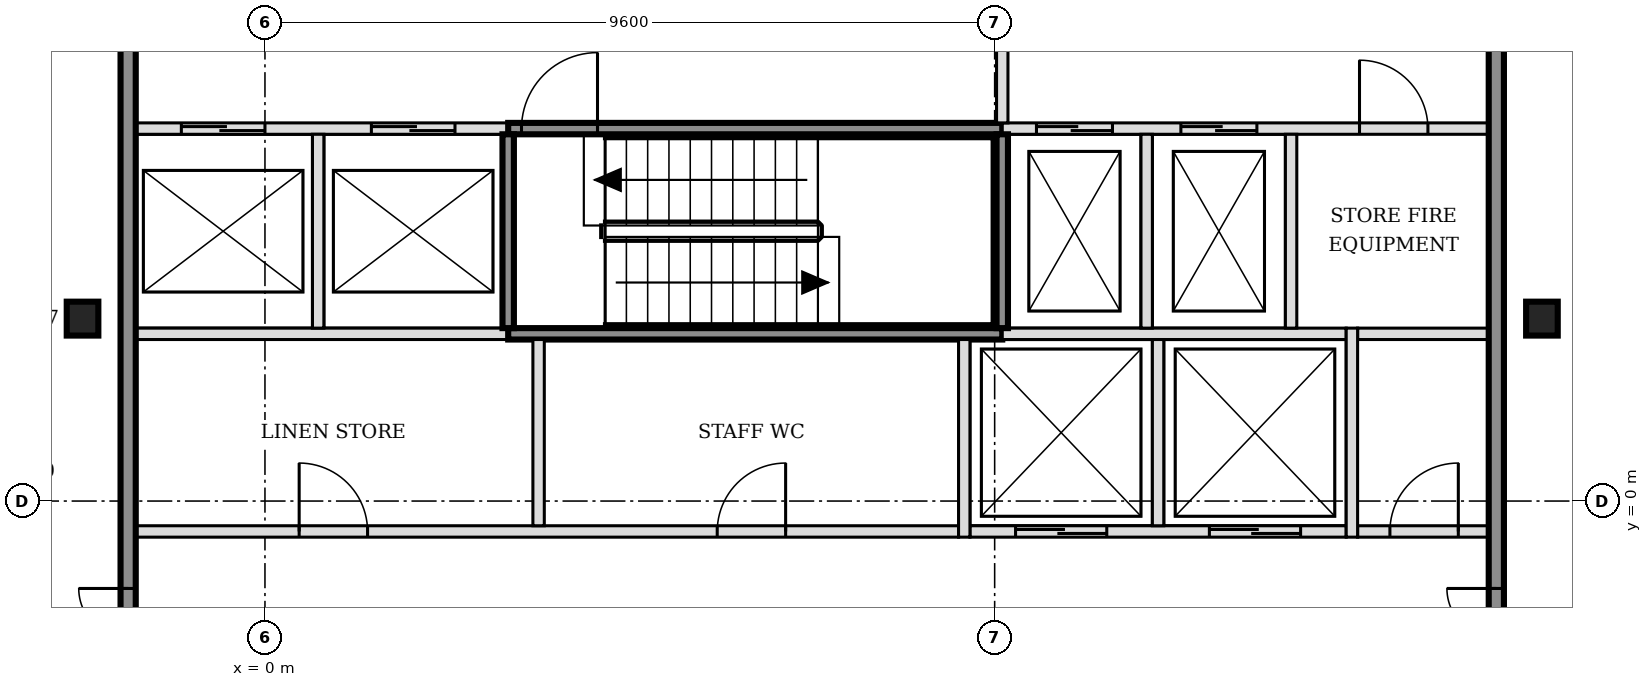
"""IFC4 building model, lengths in metres.
Left out: names, types, materials, properties, quantities, classifications, styles, units other than length and angle.
Written with IfcOpenShell. Run it as: python <this file> out.ifc"""

import sys

from ifc_helpers import new_model, si_unit, direction, frame, frame_2d, origin, origin_2d, place, context, subcontext, project, spatial, rectangle, i_section, extrude, element, fill, save


model = new_model("IFC4")
c1 = context("Model", 3, precision=1e-05, world=origin(), true_north=direction((0.0, 1.0)))
c2 = subcontext(c1, "Body", "Model", "MODEL_VIEW")
j1 = project(units=[si_unit("LENGTHUNIT", "METRE"), si_unit("PLANEANGLEUNIT", "RADIAN")], contexts=[c1])
p1 = place(None, origin())
s1 = spatial("IfcSite", under=j1, at=p1, CompositionType="ELEMENT")
p2 = place(p1, origin())
s2 = spatial("IfcBuilding", under=s1, at=p2, CompositionType="ELEMENT")
p3 = place(p2, frame((0.0, 0.0, 179.4)))
s3 = spatial("IfcBuildingStorey", under=s2, at=p3, CompositionType="ELEMENT", Elevation=179.4)
for number, where, z_axis, x_axis in (
    (1, (-2.4, 2.4, -0.15), (0.0, 0.0, 1.0), (1.0, 0.0, 0.0)),
    (2, (16.8, 2.4, -0.15), (0.0, 0.0, 1.0), (1.0, 0.0, 0.0)),
):
    element("IfcColumn", number, at=place(p3, frame(where, z_axis=z_axis, x_axis=x_axis)), inside=s3, PredefinedType="COLUMN", context=c2, shape_type="SweptSolid", body=[
        extrude(i_section(OverallWidth=0.416, OverallDepth=0.446, WebThickness=0.039, FlangeThickness=0.063, FilletRadius=0.015, at=origin_2d()), origin(), (0.0, 0.0, 1.0), 3.6),
    ])
p4 = place(p3, frame((-1.7, -0.4, 0.0), z_axis=(0.0, 0.0, 1.0), x_axis=(1.0, 0.0, 0.0)))
e3 = element("IfcWall", 3, at=p4, inside=s3, PredefinedType="PARTITIONING", context=c2, shape_type="SweptSolid", body=[
    extrude(rectangle(XDim=10.825, YDim=0.15, at=frame_2d((5.413, 0.0))), origin(), (0.0, 0.0, 1.0), 3.45),
])
p5 = place(p4, frame((2.15, 0.0, 0.0)))
e4 = element("IfcOpeningElement", 4, at=p5, cuts=e3, PredefinedType="OPENING", context=c2, shape_type="SweptSolid", body=[
    extrude(rectangle(XDim=0.9, YDim=2.1, at=frame_2d((0.45, 1.05))), frame((0.0, 0.085, 0.0), z_axis=(0.0, -1.0, 0.0), x_axis=(1.0, 0.0, 0.0)), (0.0, 0.0, 1.0), 0.17),
])
p6 = place(p4, frame((7.65, 0.0, 0.0)))
e5 = element("IfcOpeningElement", 5, at=p6, cuts=e3, PredefinedType="OPENING", context=c2, shape_type="SweptSolid", body=[
    extrude(rectangle(XDim=0.9, YDim=2.1, at=frame_2d((0.45, 1.05))), frame((0.0, 0.085, 0.0), z_axis=(0.0, -1.0, 0.0), x_axis=(1.0, 0.0, 0.0)), (0.0, 0.0, 1.0), 0.17),
])
p7 = place(p3, frame((9.275, -0.4, 0.0), z_axis=(0.0, 0.0, 1.0), x_axis=(1.0, 0.0, 0.0)))
e6 = element("IfcWall", 6, at=p7, inside=s3, PredefinedType="SOLIDWALL", context=c2, shape_type="SweptSolid", body=[
    extrude(rectangle(XDim=4.95, YDim=0.15, at=frame_2d((2.475, 0.0))), origin(), (0.0, 0.0, 1.0), 3.45),
])
p8 = place(p7, frame((0.6, 0.0, 0.0)))
e7 = element("IfcOpeningElement", 7, at=p8, cuts=e6, PredefinedType="OPENING", context=c2, shape_type="SweptSolid", body=[
    extrude(rectangle(XDim=1.2, YDim=2.1, at=frame_2d((0.6, 1.05))), frame((0.0, 0.085, 0.0), z_axis=(0.0, -1.0, 0.0), x_axis=(1.0, 0.0, 0.0)), (0.0, 0.0, 1.0), 0.17),
])
p9 = place(p7, frame((3.15, 0.0, 0.0)))
e8 = element("IfcOpeningElement", 8, at=p9, cuts=e6, PredefinedType="OPENING", context=c2, shape_type="SweptSolid", body=[
    extrude(rectangle(XDim=1.2, YDim=2.1, at=frame_2d((0.6, 1.05))), frame((0.0, 0.085, 0.0), z_axis=(0.0, -1.0, 0.0), x_axis=(1.0, 0.0, 0.0)), (0.0, 0.0, 1.0), 0.17),
])
p10 = place(p3, frame((14.375, -0.4, 0.0), z_axis=(0.0, 0.0, 1.0), x_axis=(1.0, 0.0, 0.0)))
e9 = element("IfcWall", 9, at=p10, inside=s3, PredefinedType="PARTITIONING", context=c2, shape_type="SweptSolid", body=[
    extrude(rectangle(XDim=1.725, YDim=0.15, at=frame_2d((0.863, 0.0))), origin(), (0.0, 0.0, 1.0), 3.45),
])
p11 = place(p10, frame((0.425, 0.0, 0.0)))
e10 = element("IfcOpeningElement", 10, at=p11, cuts=e9, PredefinedType="OPENING", context=c2, shape_type="SweptSolid", body=[
    extrude(rectangle(XDim=0.9, YDim=2.1, at=frame_2d((0.45, 1.05))), frame((0.0, 0.085, 0.0), z_axis=(0.0, -1.0, 0.0), x_axis=(1.0, 0.0, 0.0)), (0.0, 0.0, 1.0), 0.17),
])
p12 = place(p3, frame((-1.7, 2.2, 0.0), z_axis=(0.0, 0.0, 1.0), x_axis=(1.0, 0.0, 0.0)))
e11 = element("IfcWall", 11, at=p12, inside=s3, PredefinedType="SOLIDWALL", context=c2, shape_type="SweptSolid", body=[
    extrude(rectangle(XDim=4.9, YDim=0.15, at=frame_2d((2.45, 0.0))), origin(), (0.0, 0.0, 1.0), 3.45),
])
p13 = place(p3, frame((3.2, 2.2, 0.0), z_axis=(0.0, 0.0, 1.0), x_axis=(1.0, 0.0, 0.0)))
e12 = element("IfcWall", 12, at=p13, inside=s3, PredefinedType="SOLIDWALL", context=c2, shape_type="SweptSolid", body=[
    extrude(rectangle(XDim=6.5, YDim=0.15, at=frame_2d((3.25, 0.0))), origin(), (0.0, 0.0, 1.0), 3.45),
])
p14 = place(p3, frame((9.7, 2.2, 0.0), z_axis=(0.0, 0.0, 1.0), x_axis=(1.0, 0.0, 0.0)))
e13 = element("IfcWall", 13, at=p14, inside=s3, PredefinedType="SOLIDWALL", context=c2, shape_type="SweptSolid", body=[
    extrude(rectangle(XDim=4.525, YDim=0.15, at=frame_2d((2.263, 0.0))), origin(), (0.0, 0.0, 1.0), 3.45),
])
p15 = place(p3, frame((14.375, 2.2, 0.0), z_axis=(0.0, 0.0, 1.0), x_axis=(1.0, 0.0, 0.0)))
e14 = element("IfcWall", 14, at=p15, inside=s3, PredefinedType="PARTITIONING", context=c2, shape_type="SweptSolid", body=[
    extrude(rectangle(XDim=1.725, YDim=0.15, at=frame_2d((0.863, 0.0))), origin(), (0.0, 0.0, 1.0), 3.45),
])
p16 = place(p3, frame((-1.7, 4.9, 0.0), z_axis=(0.0, 0.0, 1.0), x_axis=(1.0, 0.0, 0.0)))
e15 = element("IfcWall", 15, at=p16, inside=s3, PredefinedType="SOLIDWALL", context=c2, shape_type="SweptSolid", body=[
    extrude(rectangle(XDim=4.9, YDim=0.15, at=frame_2d((2.45, 0.0))), origin(), (0.0, 0.0, 1.0), 3.45),
])
p17 = place(p16, frame((0.6, 0.0, 0.0)))
e16 = element("IfcOpeningElement", 16, at=p17, cuts=e15, PredefinedType="OPENING", context=c2, shape_type="SweptSolid", body=[
    extrude(rectangle(XDim=1.1, YDim=2.1, at=frame_2d((0.55, 1.05))), frame((0.0, 0.085, 0.0), z_axis=(0.0, -1.0, 0.0), x_axis=(1.0, 0.0, 0.0)), (0.0, 0.0, 1.0), 0.17),
])
p18 = place(p16, frame((3.1, 0.0, 0.0)))
e17 = element("IfcOpeningElement", 17, at=p18, cuts=e15, PredefinedType="OPENING", context=c2, shape_type="SweptSolid", body=[
    extrude(rectangle(XDim=1.1, YDim=2.1, at=frame_2d((0.55, 1.05))), frame((0.0, 0.085, 0.0), z_axis=(0.0, -1.0, 0.0), x_axis=(1.0, 0.0, 0.0)), (0.0, 0.0, 1.0), 0.17),
])
p19 = place(p3, frame((3.2, 4.9, 0.0), z_axis=(0.0, 0.0, 1.0), x_axis=(1.0, 0.0, 0.0)))
e18 = element("IfcWall", 18, at=p19, inside=s3, PredefinedType="SOLIDWALL", context=c2, shape_type="SweptSolid", body=[
    extrude(rectangle(XDim=6.5, YDim=0.15, at=frame_2d((3.25, 0.0))), origin(), (0.0, 0.0, 1.0), 3.45),
])
p20 = place(p19, frame((0.175, 0.0, 0.0)))
e19 = element("IfcOpeningElement", 19, at=p20, cuts=e18, PredefinedType="OPENING", context=c2, shape_type="SweptSolid", body=[
    extrude(rectangle(XDim=1.0, YDim=2.1, at=frame_2d((0.5, 1.05))), frame((0.0, 0.085, 0.0), z_axis=(0.0, -1.0, 0.0), x_axis=(1.0, 0.0, 0.0)), (0.0, 0.0, 1.0), 0.17),
])
p21 = place(p3, frame((9.7, 4.9, 0.0), z_axis=(0.0, 0.0, 1.0), x_axis=(1.0, 0.0, 0.0)))
e20 = element("IfcWall", 20, at=p21, inside=s3, PredefinedType="SOLIDWALL", context=c2, shape_type="SweptSolid", body=[
    extrude(rectangle(XDim=6.4, YDim=0.15, at=frame_2d((3.2, 0.0))), origin(), (0.0, 0.0, 1.0), 3.45),
])
p22 = place(p21, frame((0.45, 0.0, 0.0)))
e21 = element("IfcOpeningElement", 21, at=p22, cuts=e20, PredefinedType="OPENING", context=c2, shape_type="SweptSolid", body=[
    extrude(rectangle(XDim=1.0, YDim=2.1, at=frame_2d((0.5, 1.05))), frame((0.0, 0.085, 0.0), z_axis=(0.0, -1.0, 0.0), x_axis=(1.0, 0.0, 0.0)), (0.0, 0.0, 1.0), 0.17),
])
p23 = place(p21, frame((2.35, 0.0, 0.0)))
e22 = element("IfcOpeningElement", 22, at=p23, cuts=e20, PredefinedType="OPENING", context=c2, shape_type="SweptSolid", body=[
    extrude(rectangle(XDim=1.0, YDim=2.1, at=frame_2d((0.5, 1.05))), frame((0.0, 0.085, 0.0), z_axis=(0.0, -1.0, 0.0), x_axis=(1.0, 0.0, 0.0)), (0.0, 0.0, 1.0), 0.17),
])
p24 = place(p21, frame((4.7, 0.0, 0.0)))
e23 = element("IfcOpeningElement", 23, at=p24, cuts=e20, PredefinedType="OPENING", context=c2, shape_type="SweptSolid", body=[
    extrude(rectangle(XDim=0.9, YDim=2.1, at=frame_2d((0.45, 1.05))), frame((0.0, 0.085, 0.0), z_axis=(0.0, -1.0, 0.0), x_axis=(1.0, 0.0, 0.0)), (0.0, 0.0, 1.0), 0.17),
])
p25 = place(p3, frame((-1.8, -5.5, 0.0), z_axis=(0.0, 0.0, 1.0), x_axis=(0.0, 1.0, 0.0)))
e24 = element("IfcWall", 24, at=p25, inside=s3, PredefinedType="SOLIDWALL", context=c2, shape_type="SweptSolid", body=[
    extrude(rectangle(XDim=15.8, YDim=0.2, at=frame_2d((7.9, 0.0))), origin(), (0.0, 0.0, 1.0), 3.45),
])
p26 = place(p25, frame((3.05, 0.0, 0.0)))
e25 = element("IfcOpeningElement", 25, at=p26, cuts=e24, PredefinedType="OPENING", context=c2, shape_type="SweptSolid", body=[
    extrude(rectangle(XDim=1.3, YDim=2.1, at=frame_2d((0.65, 1.05))), frame((0.0, 0.11, 0.0), z_axis=(0.0, -1.0, 0.0), x_axis=(1.0, 0.0, 0.0)), (0.0, 0.0, 1.0), 0.22),
])
p27 = place(p25, frame((11.45, 0.0, 0.0)))
e26 = element("IfcOpeningElement", 26, at=p27, cuts=e24, PredefinedType="OPENING", context=c2, shape_type="SweptSolid", body=[
    extrude(rectangle(XDim=1.3, YDim=2.1, at=frame_2d((0.65, 1.05))), frame((0.0, 0.11, 0.0), z_axis=(0.0, -1.0, 0.0), x_axis=(1.0, 0.0, 0.0)), (0.0, 0.0, 1.0), 0.22),
])
for number, where, z_axis, x_axis in (
    (27, (0.7, 2.275, 0.0), (0.0, 0.0, 1.0), (0.0, 1.0, 0.0)),
    (28, (3.2, 2.275, 0.0), (0.0, 0.0, 1.0), (0.0, 1.0, 0.0)),
):
    element("IfcWall", number, at=place(p3, frame(where, z_axis=z_axis, x_axis=x_axis)), inside=s3, PredefinedType="SOLIDWALL", context=c2, shape_type="SweptSolid", body=[
        extrude(rectangle(XDim=2.55, YDim=0.15, at=frame_2d((1.275, 0.0))), origin(), (0.0, 0.0, 1.0), 3.45),
    ])
p28 = place(p3, frame((3.6, -0.325, 0.0), z_axis=(0.0, 0.0, 1.0), x_axis=(0.0, 1.0, 0.0)))
e29 = element("IfcWall", 29, at=p28, inside=s3, PredefinedType="PARTITIONING", context=c2, shape_type="SweptSolid", body=[
    extrude(rectangle(XDim=2.45, YDim=0.15, at=frame_2d((1.225, 0.0))), origin(), (0.0, 0.0, 1.0), 3.45),
])
p29 = place(p3, frame((9.2, -0.475, 0.0), z_axis=(0.0, 0.0, 1.0), x_axis=(0.0, 1.0, 0.0)))
e30 = element("IfcWall", 30, at=p29, inside=s3, PredefinedType="SOLIDWALL", context=c2, shape_type="SweptSolid", body=[
    extrude(rectangle(XDim=2.6, YDim=0.15, at=frame_2d((1.3, 0.0))), origin(), (0.0, 0.0, 1.0), 3.45),
])
p30 = place(p3, frame((9.7, 2.275, 0.0), z_axis=(0.0, 0.0, 1.0), x_axis=(0.0, 1.0, 0.0)))
e31 = element("IfcWall", 31, at=p30, inside=s3, PredefinedType="SOLIDWALL", context=c2, shape_type="SweptSolid", body=[
    extrude(rectangle(XDim=2.55, YDim=0.15, at=frame_2d((1.275, 0.0))), origin(), (0.0, 0.0, 1.0), 3.45),
])
p31 = place(p3, frame((9.7, 4.975, 0.0), z_axis=(0.0, 0.0, 1.0), x_axis=(0.0, 1.0, 0.0)))
e32 = element("IfcWall", 32, at=p31, inside=s3, PredefinedType="SOLIDWALL", context=c2, shape_type="SweptSolid", body=[
    extrude(rectangle(XDim=2.45, YDim=0.15, at=frame_2d((1.225, 0.0))), origin(), (0.0, 0.0, 1.0), 3.45),
])
p32 = place(p3, frame((11.6, 2.275, 0.0), z_axis=(0.0, 0.0, 1.0), x_axis=(0.0, 1.0, 0.0)))
e33 = element("IfcWall", 33, at=p32, inside=s3, PredefinedType="SOLIDWALL", context=c2, shape_type="SweptSolid", body=[
    extrude(rectangle(XDim=2.55, YDim=0.15, at=frame_2d((1.275, 0.0))), origin(), (0.0, 0.0, 1.0), 3.45),
])
p33 = place(p3, frame((11.75, -0.325, 0.0), z_axis=(0.0, 0.0, 1.0), x_axis=(0.0, 1.0, 0.0)))
e34 = element("IfcWall", 34, at=p33, inside=s3, PredefinedType="SOLIDWALL", context=c2, shape_type="SweptSolid", body=[
    extrude(rectangle(XDim=2.45, YDim=0.15, at=frame_2d((1.225, 0.0))), origin(), (0.0, 0.0, 1.0), 3.45),
])
p34 = place(p3, frame((13.5, 2.275, 0.0), z_axis=(0.0, 0.0, 1.0), x_axis=(0.0, 1.0, 0.0)))
e35 = element("IfcWall", 35, at=p34, inside=s3, PredefinedType="SOLIDWALL", context=c2, shape_type="SweptSolid", body=[
    extrude(rectangle(XDim=2.55, YDim=0.15, at=frame_2d((1.275, 0.0))), origin(), (0.0, 0.0, 1.0), 3.45),
])
p35 = place(p3, frame((14.3, -0.475, 0.0), z_axis=(0.0, 0.0, 1.0), x_axis=(0.0, 1.0, 0.0)))
e36 = element("IfcWall", 36, at=p35, inside=s3, PredefinedType="SOLIDWALL", context=c2, shape_type="SweptSolid", body=[
    extrude(rectangle(XDim=2.75, YDim=0.15, at=frame_2d((1.375, 0.0))), origin(), (0.0, 0.0, 1.0), 3.45),
])
p36 = place(p3, frame((16.2, -5.5, 0.0), z_axis=(0.0, 0.0, 1.0), x_axis=(0.0, 1.0, 0.0)))
e37 = element("IfcWall", 37, at=p36, inside=s3, PredefinedType="SOLIDWALL", context=c2, shape_type="SweptSolid", body=[
    extrude(rectangle(XDim=15.8, YDim=0.2, at=frame_2d((7.9, 0.0))), origin(), (0.0, 0.0, 1.0), 3.45),
])
p37 = place(p36, frame((3.05, 0.0, 0.0)))
e38 = element("IfcOpeningElement", 38, at=p37, cuts=e37, PredefinedType="OPENING", context=c2, shape_type="SweptSolid", body=[
    extrude(rectangle(XDim=1.3, YDim=2.1, at=frame_2d((0.65, 1.05))), frame((0.0, 0.11, 0.0), z_axis=(0.0, -1.0, 0.0), x_axis=(1.0, 0.0, 0.0)), (0.0, 0.0, 1.0), 0.22),
])
p38 = place(p36, frame((11.45, 0.0, 0.0)))
e39 = element("IfcOpeningElement", 39, at=p38, cuts=e37, PredefinedType="OPENING", context=c2, shape_type="SweptSolid", body=[
    extrude(rectangle(XDim=1.3, YDim=2.1, at=frame_2d((0.65, 1.05))), frame((0.0, 0.11, 0.0), z_axis=(0.0, -1.0, 0.0), x_axis=(1.0, 0.0, 0.0)), (0.0, 0.0, 1.0), 0.22),
])
p39 = place(p3, frame((31.072, 4.722, 0.0), z_axis=(0.0, 0.0, 1.0), x_axis=(-0.707101007496, 0.70711255483, 0.0)))
e40 = element("IfcWall", 40, at=p39, inside=s3, PredefinedType="PARTITIONING", context=c2, shape_type="SweptSolid", body=[
    extrude(rectangle(XDim=21.143, YDim=0.15, at=frame_2d((10.571, 0.0))), origin(), (0.0, 0.0, 1.0), 2.73),
])
p40 = place(p39, frame((4.108, 0.0, 0.0)))
e41 = element("IfcOpeningElement", 41, at=p40, cuts=e40, PredefinedType="OPENING", context=c2, shape_type="SweptSolid", body=[
    extrude(rectangle(XDim=0.9, YDim=2.1, at=frame_2d((0.45, 1.05))), frame((0.0, 0.085, 0.0), z_axis=(0.0, -1.0, 0.0), x_axis=(1.0, 0.0, 0.0)), (0.0, 0.0, 1.0), 0.17),
])
p41 = place(p39, frame((11.367, 0.0, 0.0)))
e42 = element("IfcOpeningElement", 42, at=p41, cuts=e40, PredefinedType="OPENING", context=c2, shape_type="SweptSolid", body=[
    extrude(rectangle(XDim=0.9, YDim=2.1, at=frame_2d((0.45, 1.05))), frame((0.0, 0.085, 0.0), z_axis=(0.0, -1.0, 0.0), x_axis=(1.0, 0.0, 0.0)), (0.0, 0.0, 1.0), 0.17),
])
p42 = place(p39, frame((16.556, 0.0, 0.0)))
e43 = element("IfcOpeningElement", 43, at=p42, cuts=e40, PredefinedType="OPENING", context=c2, shape_type="SweptSolid", body=[
    extrude(rectangle(XDim=0.9, YDim=2.1, at=frame_2d((0.45, 1.05))), frame((0.0, 0.085, 0.0), z_axis=(0.0, -1.0, 0.0), x_axis=(1.0, 0.0, 0.0)), (0.0, 0.0, 1.0), 0.17),
])
p43 = place(p8, origin())
e44 = element("IfcDoor", 44, at=p43, inside=s3, OperationType="DOUBLE_DOOR_SLIDING", PredefinedType="DOOR", context=c2, shape_type="SweptSolid", body=[
    extrude(rectangle(XDim=1.2, YDim=2.1, at=frame_2d((0.6, 1.05))), frame((0.0, 0.025, 0.0), z_axis=(0.0, -1.0, 0.0), x_axis=(1.0, 0.0, 0.0)), (0.0, 0.0, 1.0), 0.05),
])
fill(e7, e44)
p44 = place(p9, origin())
e45 = element("IfcDoor", 45, at=p44, inside=s3, OperationType="DOUBLE_DOOR_SLIDING", PredefinedType="DOOR", context=c2, shape_type="SweptSolid", body=[
    extrude(rectangle(XDim=1.2, YDim=2.1, at=frame_2d((0.6, 1.05))), frame((0.0, 0.025, 0.0), z_axis=(0.0, -1.0, 0.0), x_axis=(1.0, 0.0, 0.0)), (0.0, 0.0, 1.0), 0.05),
])
fill(e8, e45)
p45 = place(p17, origin())
e46 = element("IfcDoor", 46, at=p45, inside=s3, OperationType="DOUBLE_DOOR_SLIDING", PredefinedType="DOOR", context=c2, shape_type="SweptSolid", body=[
    extrude(rectangle(XDim=1.1, YDim=2.1, at=frame_2d((0.55, 1.05))), frame((0.0, 0.025, 0.0), z_axis=(0.0, -1.0, 0.0), x_axis=(1.0, 0.0, 0.0)), (0.0, 0.0, 1.0), 0.05),
])
fill(e16, e46)
p46 = place(p18, origin())
e47 = element("IfcDoor", 47, at=p46, inside=s3, OperationType="DOUBLE_DOOR_SLIDING", PredefinedType="DOOR", context=c2, shape_type="SweptSolid", body=[
    extrude(rectangle(XDim=1.1, YDim=2.1, at=frame_2d((0.55, 1.05))), frame((0.0, 0.025, 0.0), z_axis=(0.0, -1.0, 0.0), x_axis=(1.0, 0.0, 0.0)), (0.0, 0.0, 1.0), 0.05),
])
fill(e17, e47)
p47 = place(p22, origin())
e48 = element("IfcDoor", 48, at=p47, inside=s3, OperationType="DOUBLE_DOOR_SLIDING", PredefinedType="DOOR", context=c2, shape_type="SweptSolid", body=[
    extrude(rectangle(XDim=1.0, YDim=2.1, at=frame_2d((0.5, 1.05))), frame((0.0, 0.025, 0.0), z_axis=(0.0, -1.0, 0.0), x_axis=(1.0, 0.0, 0.0)), (0.0, 0.0, 1.0), 0.05),
])
fill(e21, e48)
p48 = place(p23, origin())
e49 = element("IfcDoor", 49, at=p48, inside=s3, OperationType="DOUBLE_DOOR_SLIDING", PredefinedType="DOOR", context=c2, shape_type="SweptSolid", body=[
    extrude(rectangle(XDim=1.0, YDim=2.1, at=frame_2d((0.5, 1.05))), frame((0.0, 0.025, 0.0), z_axis=(0.0, -1.0, 0.0), x_axis=(1.0, 0.0, 0.0)), (0.0, 0.0, 1.0), 0.05),
])
fill(e22, e49)
p49 = place(p20, origin())
e50 = element("IfcDoor", 50, at=p49, inside=s3, OperationType="SINGLE_SWING_RIGHT", PredefinedType="DOOR", context=c2, shape_type="SweptSolid", body=[
    extrude(rectangle(XDim=1.0, YDim=2.1, at=frame_2d((0.5, 1.05))), frame((0.0, 0.025, 0.0), z_axis=(0.0, -1.0, 0.0), x_axis=(1.0, 0.0, 0.0)), (0.0, 0.0, 1.0), 0.05),
])
fill(e19, e50)
p50 = place(p26, origin())
e51 = element("IfcDoor", 51, at=p50, inside=s3, OperationType="DOUBLE_DOOR_SINGLE_SWING", PredefinedType="DOOR", context=c2, shape_type="SweptSolid", body=[
    extrude(rectangle(XDim=1.3, YDim=2.1, at=frame_2d((0.65, 1.05))), frame((0.0, 0.025, 0.0), z_axis=(0.0, -1.0, 0.0), x_axis=(1.0, 0.0, 0.0)), (0.0, 0.0, 1.0), 0.05),
])
fill(e25, e51)
p51 = place(p37, origin())
e52 = element("IfcDoor", 52, at=p51, inside=s3, OperationType="DOUBLE_DOOR_SINGLE_SWING", PredefinedType="DOOR", context=c2, shape_type="SweptSolid", body=[
    extrude(rectangle(XDim=1.3, YDim=2.1, at=frame_2d((0.65, 1.05))), frame((0.0, 0.025, 0.0), z_axis=(0.0, -1.0, 0.0), x_axis=(1.0, 0.0, 0.0)), (0.0, 0.0, 1.0), 0.05),
])
fill(e38, e52)
p52 = place(p11, origin())
e53 = element("IfcDoor", 53, at=p52, inside=s3, OperationType="SINGLE_SWING_RIGHT", PredefinedType="DOOR", context=c2, shape_type="SweptSolid", body=[
    extrude(rectangle(XDim=0.9, YDim=2.1, at=frame_2d((0.45, 1.05))), frame((0.0, 0.025, 0.0), z_axis=(0.0, -1.0, 0.0), x_axis=(1.0, 0.0, 0.0)), (0.0, 0.0, 1.0), 0.05),
])
fill(e10, e53)
p53 = place(p24, origin())
e54 = element("IfcDoor", 54, at=p53, inside=s3, OperationType="SINGLE_SWING_LEFT", PredefinedType="DOOR", context=c2, shape_type="SweptSolid", body=[
    extrude(rectangle(XDim=0.9, YDim=2.1, at=frame_2d((0.45, 1.05))), frame((0.0, 0.025, 0.0), z_axis=(0.0, -1.0, 0.0), x_axis=(1.0, 0.0, 0.0)), (0.0, 0.0, 1.0), 0.05),
])
fill(e23, e54)
p54 = place(p5, origin())
e55 = element("IfcDoor", 55, at=p54, inside=s3, OperationType="SINGLE_SWING_LEFT", PredefinedType="DOOR", context=c2, shape_type="SweptSolid", body=[
    extrude(rectangle(XDim=0.9, YDim=2.1, at=frame_2d((0.45, 1.05))), frame((0.0, 0.025, 0.0), z_axis=(0.0, -1.0, 0.0), x_axis=(1.0, 0.0, 0.0)), (0.0, 0.0, 1.0), 0.05),
])
fill(e4, e55)
p55 = place(p6, origin())
e56 = element("IfcDoor", 56, at=p55, inside=s3, OperationType="SINGLE_SWING_RIGHT", PredefinedType="DOOR", context=c2, shape_type="SweptSolid", body=[
    extrude(rectangle(XDim=0.9, YDim=2.1, at=frame_2d((0.45, 1.05))), frame((0.0, 0.025, 0.0), z_axis=(0.0, -1.0, 0.0), x_axis=(1.0, 0.0, 0.0)), (0.0, 0.0, 1.0), 0.05),
])
fill(e5, e56)
save(model, sys.argv[1])
